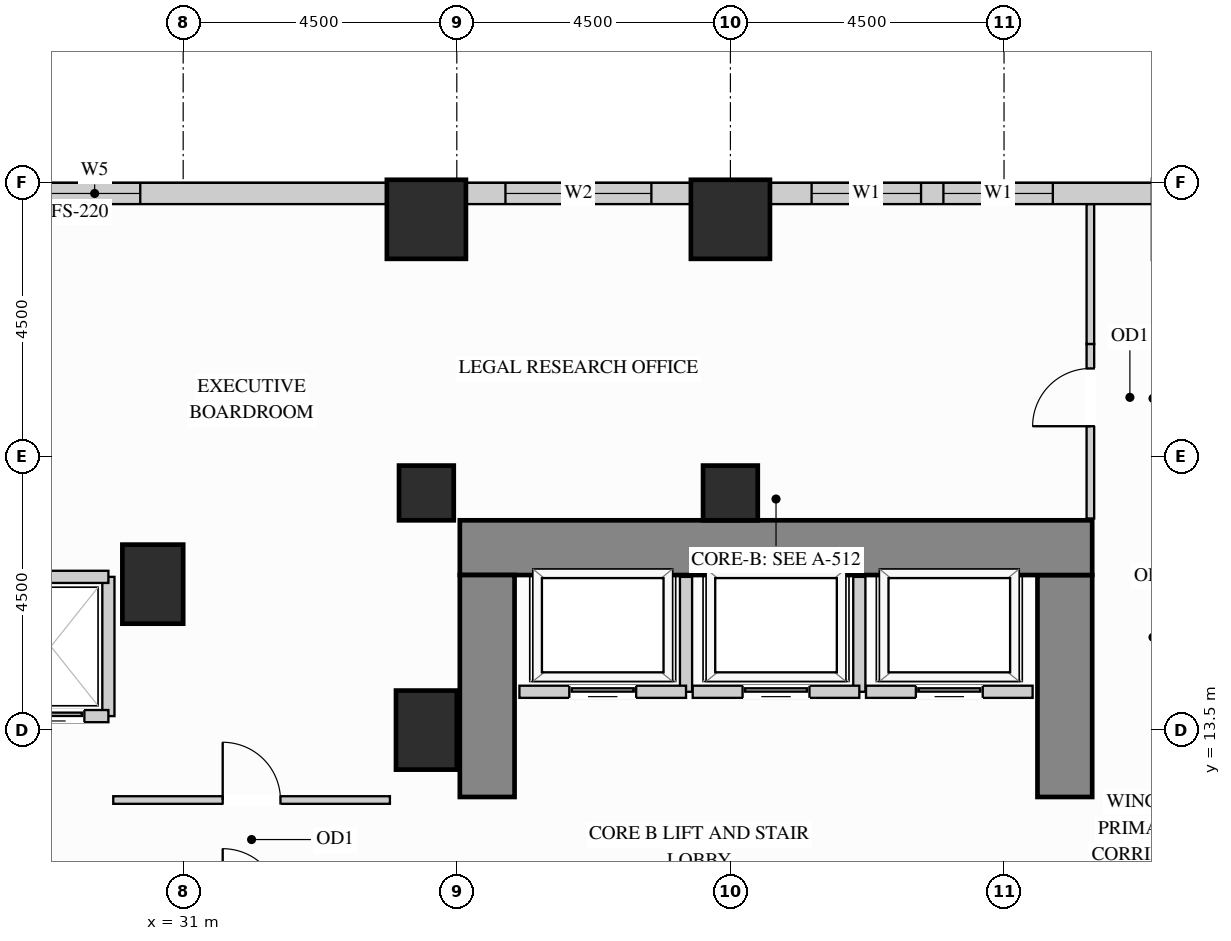
"""IFC4 building model, lengths in metres.
Left out: names, types, materials, properties, quantities, classifications, styles, units other than length and angle.
Written with IfcOpenShell. Run it as: python <this file> out.ifc"""

import sys

from ifc_helpers import new_model, si_unit, direction, frame, frame_2d, origin, origin_2d, place, context, subcontext, project, spatial, rectangle, extrude, source, transform, mapped, element, fill, save


model = new_model("IFC4")
c1 = context("Model", 3, precision=1e-05, world=origin(), true_north=direction((0.0, 1.0)))
c2 = subcontext(c1, "Body", "Model", "MODEL_VIEW")
j1 = project(units=[si_unit("LENGTHUNIT", "METRE"), si_unit("PLANEANGLEUNIT", "RADIAN")], contexts=[c1])
p1 = place(None, origin())
s1 = spatial("IfcSite", under=j1, at=p1, CompositionType="ELEMENT")
p2 = place(p1, origin())
s2 = spatial("IfcBuilding", under=s1, at=p2, CompositionType="ELEMENT")
p3 = place(p2, frame((0.0, 0.0, 29.7)))
s3 = spatial("IfcBuildingStorey", under=s2, at=p3, CompositionType="ELEMENT", Elevation=29.7)
m1 = source(origin(), c2, "Body", "SweptSolid", [
    extrude(rectangle(XDim=0.9, YDim=0.9, at=origin_2d()), origin(), (0.0, 0.0, 1.0), 3.38),
])
for number, where, z_axis, x_axis in (
    (1, (35.0, 17.4, 0.0), (0.0, 0.0, 1.0), (1.0, 0.0, 0.0)),
    (2, (40.0, 17.4, 0.0), (0.0, 0.0, 1.0), (1.0, 0.0, 0.0)),
):
    element("IfcColumn", number, at=place(p3, frame(where, z_axis=z_axis, x_axis=x_axis)), inside=s3, PredefinedType="COLUMN", context=c2, shape_type="MappedRepresentation", body=[
        mapped(m1, transform((0.0, 0.0, 0.0), x_axis=(1.0, 0.0, 0.0), y_axis=(0.0, 1.0, 0.0), z_axis=(0.0, 0.0, 1.0))),
    ])
m2 = source(origin(), c2, "Body", "SweptSolid", [
    extrude(rectangle(XDim=1.0, YDim=1.3, at=origin_2d()), origin(), (0.0, 0.0, 1.0), 3.38),
])
for number, where, z_axis, x_axis in (
    (3, (35.0, 13.5, 0.0), (0.0, 0.0, 1.0), (1.0, 0.0, 0.0)),
    (4, (30.5, 15.9, 0.0), (0.0, 0.0, 1.0), (1.0, 0.0, 0.0)),
):
    element("IfcColumn", number, at=place(p3, frame(where, z_axis=z_axis, x_axis=x_axis)), inside=s3, PredefinedType="COLUMN", context=c2, shape_type="MappedRepresentation", body=[
        mapped(m2, transform((0.0, 0.0, 0.0), x_axis=(1.0, 0.0, 0.0), y_axis=(0.0, 1.0, 0.0), z_axis=(0.0, 0.0, 1.0))),
    ])
m3 = source(origin(), c2, "Body", "SweptSolid", [
    extrude(rectangle(XDim=1.3, YDim=1.3, at=origin_2d()), origin(), (0.0, 0.0, 1.0), 3.38),
])
for number, where, z_axis, x_axis in (
    (5, (35.0, 21.9, 0.0), (0.0, 0.0, 1.0), (1.0, 0.0, 0.0)),
    (6, (40.0, 21.9, 0.0), (0.0, 0.0, 1.0), (1.0, 0.0, 0.0)),
):
    element("IfcColumn", number, at=place(p3, frame(where, z_axis=z_axis, x_axis=x_axis)), inside=s3, PredefinedType="COLUMN", context=c2, shape_type="MappedRepresentation", body=[
        mapped(m3, transform((0.0, 0.0, 0.0), x_axis=(1.0, 0.0, 0.0), y_axis=(0.0, 1.0, 0.0), z_axis=(0.0, 0.0, 1.0))),
    ])
m4 = source(origin(), c2, "Body", "SweptSolid", [
    extrude(rectangle(XDim=3.65, YDim=0.9, at=frame_2d((1.825, 0.0))), origin(), (0.0, 0.0, 1.0), 3.38),
])
p4 = place(p3, frame((45.5, 12.4, 0.0), z_axis=(0.0, 0.0, 1.0), x_axis=(0.0, 1.0, 0.0)))
e7 = element("IfcWall", 7, at=p4, inside=s3, PredefinedType="SHEAR", context=c2, shape_type="MappedRepresentation", body=[
    mapped(m4, transform((0.0, 0.0, 0.0), x_axis=(1.0, 0.0, 0.0), y_axis=(0.0, 1.0, 0.0), z_axis=(0.0, 0.0, 1.0))),
])
m5 = source(origin(), c2, "Body", "SweptSolid", [
    extrude(rectangle(XDim=10.4, YDim=0.9, at=frame_2d((5.2, 0.0))), origin(), (0.0, 0.0, 1.0), 3.38),
])
p5 = place(p3, frame((35.55, 16.5, 0.0), z_axis=(0.0, 0.0, 1.0), x_axis=(1.0, 0.0, 0.0)))
e8 = element("IfcWall", 8, at=p5, inside=s3, PredefinedType="SHEAR", context=c2, shape_type="MappedRepresentation", body=[
    mapped(m5, transform((0.0, 0.0, 0.0), x_axis=(1.0, 0.0, 0.0), y_axis=(0.0, 1.0, 0.0), z_axis=(0.0, 0.0, 1.0))),
])
p6 = place(p3, frame((36.0, 12.4, 0.0), z_axis=(0.0, 0.0, 1.0), x_axis=(0.0, 1.0, 0.0)))
e9 = element("IfcWall", 9, at=p6, inside=s3, PredefinedType="SHEAR", context=c2, shape_type="MappedRepresentation", body=[
    mapped(m4, transform((0.0, 0.0, 0.0), x_axis=(1.0, 0.0, 0.0), y_axis=(0.0, 1.0, 0.0), z_axis=(0.0, 0.0, 1.0))),
])
p7 = place(p3, frame((46.952, 22.325, 0.0), z_axis=(0.0, 0.0, 1.0), x_axis=(-1.0, 0.0, 0.0)))
e10 = element("IfcWall", 10, at=p7, inside=s3, PredefinedType="SOLIDWALL", context=c2, shape_type="SweptSolid", body=[
    extrude(rectangle(XDim=6.304, YDim=0.35, at=frame_2d((3.152, 0.0))), origin(), (0.0, 0.0, 1.0), 2.51),
])
p8 = place(p7, frame((1.649, 0.0, 0.78)))
e11 = element("IfcOpeningElement", 11, at=p8, cuts=e10, PredefinedType="OPENING", context=c2, shape_type="SweptSolid", body=[
    extrude(rectangle(XDim=1.8, YDim=1.55, at=frame_2d((0.9, 0.775))), frame((0.0, 0.185, 0.0), z_axis=(0.0, -1.0, 0.0), x_axis=(1.0, 0.0, 0.0)), (0.0, 0.0, 1.0), 0.37),
])
p9 = place(p7, frame((3.817, 0.0, 0.78)))
e12 = element("IfcOpeningElement", 12, at=p9, cuts=e10, PredefinedType="OPENING", context=c2, shape_type="SweptSolid", body=[
    extrude(rectangle(XDim=1.8, YDim=1.55, at=frame_2d((0.9, 0.775))), frame((0.0, 0.185, 0.0), z_axis=(0.0, -1.0, 0.0), x_axis=(1.0, 0.0, 0.0)), (0.0, 0.0, 1.0), 0.37),
])
p10 = place(p3, frame((39.352, 22.325, 0.0), z_axis=(0.0, 0.0, 1.0), x_axis=(-1.0, 0.0, 0.0)))
e13 = element("IfcWall", 13, at=p10, inside=s3, PredefinedType="SOLIDWALL", context=c2, shape_type="SweptSolid", body=[
    extrude(rectangle(XDim=3.704, YDim=0.35, at=frame_2d((1.852, 0.0))), origin(), (0.0, 0.0, 1.0), 2.51),
])
p11 = place(p10, frame((0.652, 0.0, 0.78)))
e14 = element("IfcOpeningElement", 14, at=p11, cuts=e13, PredefinedType="OPENING", context=c2, shape_type="SweptSolid", body=[
    extrude(rectangle(XDim=2.4, YDim=1.55, at=frame_2d((1.2, 0.775))), frame((0.0, 0.185, 0.0), z_axis=(0.0, -1.0, 0.0), x_axis=(1.0, 0.0, 0.0)), (0.0, 0.0, 1.0), 0.37),
])
p12 = place(p3, frame((34.352, 22.325, 0.0), z_axis=(0.0, 0.0, 1.0), x_axis=(-1.0, 0.0, 0.0)))
e15 = element("IfcWall", 15, at=p12, inside=s3, PredefinedType="SOLIDWALL", context=c2, shape_type="SweptSolid", body=[
    extrude(rectangle(XDim=14.854, YDim=0.35, at=frame_2d((7.427, 0.0))), origin(), (0.0, 0.0, 1.0), 3.365),
])
p13 = place(p12, frame((4.058, 0.0, 0.78)))
e16 = element("IfcOpeningElement", 16, at=p13, cuts=e15, PredefinedType="OPENING", context=c2, shape_type="SweptSolid", body=[
    extrude(rectangle(XDim=1.5, YDim=2.0, at=frame_2d((0.75, 1.0))), frame((0.0, 0.185, 0.0), z_axis=(0.0, -1.0, 0.0), x_axis=(1.0, 0.0, 0.0)), (0.0, 0.0, 1.0), 0.37),
])
p14 = place(p12, frame((9.296, 0.0, 0.78)))
e17 = element("IfcOpeningElement", 17, at=p14, cuts=e15, PredefinedType="OPENING", context=c2, shape_type="SweptSolid", body=[
    extrude(rectangle(XDim=1.5, YDim=2.0, at=frame_2d((0.75, 1.0))), frame((0.0, 0.185, 0.0), z_axis=(0.0, -1.0, 0.0), x_axis=(1.0, 0.0, 0.0)), (0.0, 0.0, 1.0), 0.37),
])
p15 = place(p3, frame((45.92, 16.98, 0.0), z_axis=(0.0, 0.0, 1.0), x_axis=(0.0, 1.0, 0.0)))
e18 = element("IfcWall", 18, at=p15, inside=s3, PredefinedType="PARTITIONING", context=c2, shape_type="SweptSolid", body=[
    extrude(rectangle(XDim=2.87, YDim=0.125, at=frame_2d((1.435, 0.0))), origin(), (0.0, 0.0, 1.0), 3.365),
])
p16 = place(p15, frame((1.517, 0.0, 0.0)))
e19 = element("IfcOpeningElement", 19, at=p16, cuts=e18, PredefinedType="OPENING", context=c2, shape_type="SweptSolid", body=[
    extrude(rectangle(XDim=0.95, YDim=2.15, at=frame_2d((0.475, 1.075))), frame((0.0, 0.073, 0.0), z_axis=(0.0, -1.0, 0.0), x_axis=(1.0, 0.0, 0.0)), (0.0, 0.0, 1.0), 0.145),
])
m6 = source(origin(), c2, "Body", "SweptSolid", [
    extrude(rectangle(XDim=2.298, YDim=0.125, at=frame_2d((1.149, 0.0))), origin(), (0.0, 0.0, 1.0), 3.365),
])
p17 = place(p3, frame((45.92, 19.85, 0.0), z_axis=(0.0, 0.0, 1.0), x_axis=(0.0, 1.0, 0.0)))
e20 = element("IfcWall", 20, at=p17, inside=s3, PredefinedType="PARTITIONING", context=c2, shape_type="MappedRepresentation", body=[
    mapped(m6, transform((0.0, 0.0, 0.0), x_axis=(1.0, 0.0, 0.0), y_axis=(0.0, 1.0, 0.0), z_axis=(0.0, 0.0, 1.0))),
])
p18 = place(p3, frame((29.85, 12.35, 0.0), z_axis=(0.0, 0.0, 1.0), x_axis=(1.0, 0.0, 0.0)))
e21 = element("IfcWall", 21, at=p18, inside=s3, PredefinedType="PARTITIONING", context=c2, shape_type="SweptSolid", body=[
    extrude(rectangle(XDim=4.55, YDim=0.125, at=frame_2d((2.275, 0.0))), origin(), (0.0, 0.0, 1.0), 3.365),
])
p19 = place(p18, frame((1.8, 0.0, 0.0)))
e22 = element("IfcOpeningElement", 22, at=p19, cuts=e21, PredefinedType="OPENING", context=c2, shape_type="SweptSolid", body=[
    extrude(rectangle(XDim=0.95, YDim=2.15, at=frame_2d((0.475, 1.075))), frame((0.0, 0.073, 0.0), z_axis=(0.0, -1.0, 0.0), x_axis=(1.0, 0.0, 0.0)), (0.0, 0.0, 1.0), 0.145),
])
m7 = source(origin(), c2, "Body", "SweptSolid", [
    extrude(rectangle(XDim=1.89, YDim=0.2, at=frame_2d((0.945, 0.0))), origin(), (0.0, 0.0, 1.0), 3.365),
])
p20 = place(p3, frame((39.27, 14.13, 0.0), z_axis=(0.0, 0.0, 1.0), x_axis=(0.0, 1.0, 0.0)))
e23 = element("IfcWall", 23, at=p20, inside=s3, PredefinedType="PARTITIONING", context=c2, shape_type="MappedRepresentation", body=[
    mapped(m7, transform((0.0, 0.0, 0.0), x_axis=(1.0, 0.0, 0.0), y_axis=(0.0, 1.0, 0.0), z_axis=(0.0, 0.0, 1.0))),
])
p21 = place(p3, frame((36.53, 14.13, 0.0), z_axis=(0.0, 0.0, 1.0), x_axis=(1.0, 0.0, 0.0)))
e24 = element("IfcWall", 24, at=p21, inside=s3, PredefinedType="PARTITIONING", context=c2, shape_type="SweptSolid", body=[
    extrude(rectangle(XDim=2.74, YDim=0.2, at=frame_2d((1.37, 0.0))), origin(), (0.0, 0.0, 1.0), 3.365),
])
p22 = place(p21, frame((0.82, 0.0, 0.0)))
e25 = element("IfcOpeningElement", 25, at=p22, cuts=e24, PredefinedType="OPENING", context=c2, shape_type="SweptSolid", body=[
    extrude(rectangle(XDim=1.1, YDim=2.2, at=frame_2d((0.55, 1.1))), frame((0.0, 0.11, 0.0), z_axis=(0.0, -1.0, 0.0), x_axis=(1.0, 0.0, 0.0)), (0.0, 0.0, 1.0), 0.22),
])
p23 = place(p3, frame((42.12, 14.13, 0.0), z_axis=(0.0, 0.0, 1.0), x_axis=(0.0, 1.0, 0.0)))
e26 = element("IfcWall", 26, at=p23, inside=s3, PredefinedType="PARTITIONING", context=c2, shape_type="MappedRepresentation", body=[
    mapped(m7, transform((0.0, 0.0, 0.0), x_axis=(1.0, 0.0, 0.0), y_axis=(0.0, 1.0, 0.0), z_axis=(0.0, 0.0, 1.0))),
])
p24 = place(p3, frame((39.38, 14.13, 0.0), z_axis=(0.0, 0.0, 1.0), x_axis=(1.0, 0.0, 0.0)))
e27 = element("IfcWall", 27, at=p24, inside=s3, PredefinedType="PARTITIONING", context=c2, shape_type="SweptSolid", body=[
    extrude(rectangle(XDim=2.74, YDim=0.2, at=frame_2d((1.37, 0.0))), origin(), (0.0, 0.0, 1.0), 3.365),
])
p25 = place(p24, frame((0.82, 0.0, 0.0)))
e28 = element("IfcOpeningElement", 28, at=p25, cuts=e27, PredefinedType="OPENING", context=c2, shape_type="SweptSolid", body=[
    extrude(rectangle(XDim=1.1, YDim=2.2, at=frame_2d((0.55, 1.1))), frame((0.0, 0.11, 0.0), z_axis=(0.0, -1.0, 0.0), x_axis=(1.0, 0.0, 0.0)), (0.0, 0.0, 1.0), 0.22),
])
p26 = place(p3, frame((42.23, 14.13, 0.0), z_axis=(0.0, 0.0, 1.0), x_axis=(1.0, 0.0, 0.0)))
e29 = element("IfcWall", 29, at=p26, inside=s3, PredefinedType="PARTITIONING", context=c2, shape_type="SweptSolid", body=[
    extrude(rectangle(XDim=2.74, YDim=0.2, at=frame_2d((1.37, 0.0))), origin(), (0.0, 0.0, 1.0), 3.365),
])
p27 = place(p26, frame((0.82, 0.0, 0.0)))
e30 = element("IfcOpeningElement", 30, at=p27, cuts=e29, PredefinedType="OPENING", context=c2, shape_type="SweptSolid", body=[
    extrude(rectangle(XDim=1.1, YDim=2.2, at=frame_2d((0.55, 1.1))), frame((0.0, 0.11, 0.0), z_axis=(0.0, -1.0, 0.0), x_axis=(1.0, 0.0, 0.0)), (0.0, 0.0, 1.0), 0.22),
])
m8 = source(origin(), c2, "Body", "SweptSolid", [
    extrude(rectangle(XDim=2.29, YDim=0.2, at=frame_2d((1.145, 0.0))), origin(), (0.0, 0.0, 1.0), 3.365),
])
p28 = place(p3, frame((29.77, 13.73, 0.0), z_axis=(0.0, 0.0, 1.0), x_axis=(0.0, 1.0, 0.0)))
e31 = element("IfcWall", 31, at=p28, inside=s3, PredefinedType="PARTITIONING", context=c2, shape_type="MappedRepresentation", body=[
    mapped(m8, transform((0.0, 0.0, 0.0), x_axis=(1.0, 0.0, 0.0), y_axis=(0.0, 1.0, 0.0), z_axis=(0.0, 0.0, 1.0))),
])
m9 = source(origin(), c2, "Body", "SweptSolid", [
    extrude(rectangle(XDim=1.89, YDim=0.2, at=frame_2d((0.945, 0.0))), origin(), (0.0, 0.0, 1.0), 2.67),
])
p29 = place(p3, frame((27.88, 16.02, 0.0), z_axis=(0.0, 0.0, 1.0), x_axis=(1.0, 0.0, 0.0)))
e32 = element("IfcWall", 32, at=p29, inside=s3, PredefinedType="PARTITIONING", context=c2, shape_type="MappedRepresentation", body=[
    mapped(m9, transform((0.0, 0.0, 0.0), x_axis=(1.0, 0.0, 0.0), y_axis=(0.0, 1.0, 0.0), z_axis=(0.0, 0.0, 1.0))),
])
p30 = place(p3, frame((27.88, 13.73, 0.0), z_axis=(0.0, 0.0, 1.0), x_axis=(1.0, 0.0, 0.0)))
e33 = element("IfcWall", 33, at=p30, inside=s3, PredefinedType="PARTITIONING", context=c2, shape_type="SweptSolid", body=[
    extrude(rectangle(XDim=1.89, YDim=0.2, at=frame_2d((0.945, 0.0))), origin(), (0.0, 0.0, 1.0), 2.446),
])
p31 = place(p30, frame((0.395, 0.0, 0.0)))
e34 = element("IfcOpeningElement", 34, at=p31, cuts=e33, PredefinedType="OPENING", context=c2, shape_type="SweptSolid", body=[
    extrude(rectangle(XDim=1.1, YDim=2.2, at=frame_2d((0.55, 1.1))), frame((0.0, 0.11, 0.0), z_axis=(0.0, -1.0, 0.0), x_axis=(1.0, 0.0, 0.0)), (0.0, 0.0, 1.0), 0.22),
])
m10 = source(origin(), c2, "Body", "SweptSolid", [
    extrude(rectangle(XDim=1.1, YDim=2.2, at=frame_2d((0.55, 1.1))), frame((0.0, 0.025, 0.0), z_axis=(0.0, -1.0, 0.0), x_axis=(1.0, 0.0, 0.0)), (0.0, 0.0, 1.0), 0.05),
])
p32 = place(p22, origin())
e35 = element("IfcDoor", 35, at=p32, inside=s3, OperationType="SLIDING_TO_LEFT", PredefinedType="DOOR", context=c2, shape_type="MappedRepresentation", body=[
    mapped(m10, transform((0.0, 0.0, 0.0), x_axis=(1.0, 0.0, 0.0), y_axis=(0.0, 1.0, 0.0), z_axis=(0.0, 0.0, 1.0))),
])
fill(e25, e35)
p33 = place(p25, origin())
e36 = element("IfcDoor", 36, at=p33, inside=s3, OperationType="SLIDING_TO_LEFT", PredefinedType="DOOR", context=c2, shape_type="MappedRepresentation", body=[
    mapped(m10, transform((0.0, 0.0, 0.0), x_axis=(1.0, 0.0, 0.0), y_axis=(0.0, 1.0, 0.0), z_axis=(0.0, 0.0, 1.0))),
])
fill(e28, e36)
p34 = place(p27, origin())
e37 = element("IfcDoor", 37, at=p34, inside=s3, OperationType="SLIDING_TO_LEFT", PredefinedType="DOOR", context=c2, shape_type="MappedRepresentation", body=[
    mapped(m10, transform((0.0, 0.0, 0.0), x_axis=(1.0, 0.0, 0.0), y_axis=(0.0, 1.0, 0.0), z_axis=(0.0, 0.0, 1.0))),
])
fill(e30, e37)
p35 = place(p31, origin())
e38 = element("IfcDoor", 38, at=p35, inside=s3, OperationType="SLIDING_TO_LEFT", PredefinedType="DOOR", context=c2, shape_type="MappedRepresentation", body=[
    mapped(m10, transform((0.0, 0.0, 0.0), x_axis=(1.0, 0.0, 0.0), y_axis=(0.0, 1.0, 0.0), z_axis=(0.0, 0.0, 1.0))),
])
fill(e34, e38)
m11 = source(origin(), c2, "Body", "SweptSolid", [
    extrude(rectangle(XDim=0.95, YDim=2.15, at=frame_2d((0.475, 1.075))), frame((0.0, 0.025, 0.0), z_axis=(0.0, -1.0, 0.0), x_axis=(1.0, 0.0, 0.0)), (0.0, 0.0, 1.0), 0.05),
])
p36 = place(p16, origin())
e39 = element("IfcDoor", 39, at=p36, inside=s3, OperationType="SINGLE_SWING_LEFT", PredefinedType="DOOR", context=c2, shape_type="MappedRepresentation", body=[
    mapped(m11, transform((0.0, 0.0, 0.0), x_axis=(1.0, 0.0, 0.0), y_axis=(0.0, 1.0, 0.0), z_axis=(0.0, 0.0, 1.0))),
])
fill(e19, e39)
p37 = place(p19, origin())
e40 = element("IfcDoor", 40, at=p37, inside=s3, OperationType="SINGLE_SWING_LEFT", PredefinedType="DOOR", context=c2, shape_type="MappedRepresentation", body=[
    mapped(m11, transform((0.0, 0.0, 0.0), x_axis=(1.0, 0.0, 0.0), y_axis=(0.0, 1.0, 0.0), z_axis=(0.0, 0.0, 1.0))),
])
fill(e22, e40)
m12 = source(origin(), c2, "Body", "SweptSolid", [
    extrude(rectangle(XDim=1.8, YDim=1.55, at=frame_2d((0.9, 0.775))), frame((0.0, 0.03, 0.0), z_axis=(0.0, -1.0, 0.0), x_axis=(1.0, 0.0, 0.0)), (0.0, 0.0, 1.0), 0.06),
])
p38 = place(p8, origin())
e41 = element("IfcWindow", 41, at=p38, inside=s3, PartitioningType="SINGLE_PANEL", PredefinedType="WINDOW", context=c2, shape_type="MappedRepresentation", body=[
    mapped(m12, transform((0.0, 0.0, 0.0), x_axis=(1.0, 0.0, 0.0), y_axis=(0.0, 1.0, 0.0), z_axis=(0.0, 0.0, 1.0))),
])
fill(e11, e41)
p39 = place(p9, origin())
e42 = element("IfcWindow", 42, at=p39, inside=s3, PartitioningType="SINGLE_PANEL", PredefinedType="WINDOW", context=c2, shape_type="MappedRepresentation", body=[
    mapped(m12, transform((0.0, 0.0, 0.0), x_axis=(1.0, 0.0, 0.0), y_axis=(0.0, 1.0, 0.0), z_axis=(0.0, 0.0, 1.0))),
])
fill(e12, e42)
m13 = source(origin(), c2, "Body", "SweptSolid", [
    extrude(rectangle(XDim=2.4, YDim=1.55, at=frame_2d((1.2, 0.775))), frame((0.0, 0.03, 0.0), z_axis=(0.0, -1.0, 0.0), x_axis=(1.0, 0.0, 0.0)), (0.0, 0.0, 1.0), 0.06),
])
p40 = place(p11, origin())
e43 = element("IfcWindow", 43, at=p40, inside=s3, PartitioningType="SINGLE_PANEL", PredefinedType="WINDOW", context=c2, shape_type="MappedRepresentation", body=[
    mapped(m13, transform((0.0, 0.0, 0.0), x_axis=(1.0, 0.0, 0.0), y_axis=(0.0, 1.0, 0.0), z_axis=(0.0, 0.0, 1.0))),
])
fill(e14, e43)
m14 = source(origin(), c2, "Body", "SweptSolid", [
    extrude(rectangle(XDim=1.5, YDim=2.0, at=frame_2d((0.75, 1.0))), frame((0.0, 0.03, 0.0), z_axis=(0.0, -1.0, 0.0), x_axis=(1.0, 0.0, 0.0)), (0.0, 0.0, 1.0), 0.06),
])
p41 = place(p13, origin())
e44 = element("IfcWindow", 44, at=p41, inside=s3, PartitioningType="SINGLE_PANEL", PredefinedType="WINDOW", context=c2, shape_type="MappedRepresentation", body=[
    mapped(m14, transform((0.0, 0.0, 0.0), x_axis=(1.0, 0.0, 0.0), y_axis=(0.0, 1.0, 0.0), z_axis=(0.0, 0.0, 1.0))),
])
fill(e16, e44)
save(model, sys.argv[1])
